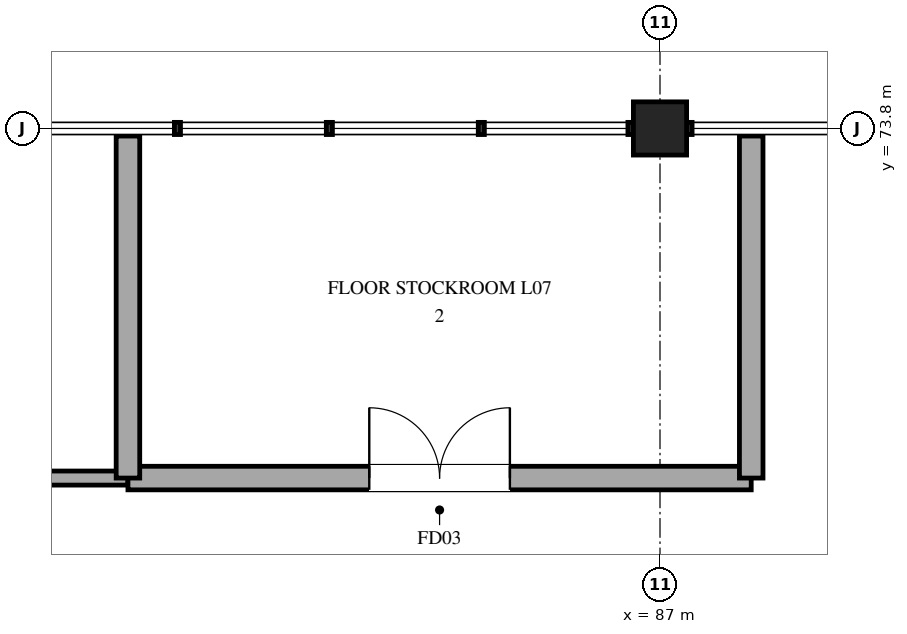
"""IFC4 building model, lengths in metres.
Left out: names, types, materials, properties, quantities, classifications, styles, units other than length and angle.
Written with IfcOpenShell. Run it as: python <this file> out.ifc"""

import sys

from ifc_helpers import new_model, si_unit, direction, frame, frame_2d, origin, origin_2d, place, context, subcontext, project, spatial, rectangle, extrude, element, fill, save


model = new_model("IFC4")
c1 = context("Model", 3, precision=1e-05, world=origin(), true_north=direction((0.0, 1.0)))
c2 = subcontext(c1, "Body", "Model", "MODEL_VIEW")
j1 = project(units=[si_unit("LENGTHUNIT", "METRE"), si_unit("PLANEANGLEUNIT", "RADIAN")], contexts=[c1])
p1 = place(None, origin())
s1 = spatial("IfcSite", under=j1, at=p1, CompositionType="ELEMENT")
p2 = place(p1, origin())
s2 = spatial("IfcBuilding", under=s1, at=p2, CompositionType="ELEMENT")
p3 = place(p2, frame((0.0, 0.0, 31.5)))
s3 = spatial("IfcBuildingStorey", under=s2, at=p3, CompositionType="ELEMENT", Elevation=31.5)
p4 = place(p3, frame((87.0, 73.8, 0.0), z_axis=(0.0, 0.0, 1.0), x_axis=(1.0, 0.0, 0.0)))
e1 = element("IfcColumn", 1, at=p4, inside=s3, PredefinedType="COLUMN", context=c2, shape_type="SweptSolid", body=[
    extrude(rectangle(XDim=0.7, YDim=0.7, at=origin_2d()), origin(), (0.0, 0.0, 1.0), 4.8),
])
p5 = place(p3, frame((52.2, 69.2, 0.0), z_axis=(0.0, 0.0, 1.0), x_axis=(1.0, 0.0, 0.0)))
e2 = element("IfcWall", 2, at=p5, inside=s3, PredefinedType="PARTITIONING", context=c2, shape_type="SweptSolid", body=[
    extrude(rectangle(XDim=27.8, YDim=0.185, at=frame_2d((13.9, 0.0))), origin(), (0.0, 0.0, 1.0), 3.76),
])
p6 = place(p5, frame((13.225, 0.0, 0.0)))
e3 = element("IfcOpeningElement", 3, at=p6, cuts=e2, PredefinedType="OPENING", context=c2, shape_type="SweptSolid", body=[
    extrude(rectangle(XDim=1.35, YDim=2.2, at=frame_2d((0.675, 1.1))), frame((0.0, 0.103, 0.0), z_axis=(0.0, -1.0, 0.0), x_axis=(1.0, 0.0, 0.0)), (0.0, 0.0, 1.0), 0.205),
])
p7 = place(p3, frame((80.0, 69.2, 0.0), z_axis=(0.0, 0.0, 1.0), x_axis=(1.0, 0.0, 0.0)))
e4 = element("IfcWall", 4, at=p7, inside=s3, PredefinedType="STANDARD", context=c2, shape_type="SweptSolid", body=[
    extrude(rectangle(XDim=8.2, YDim=0.31, at=frame_2d((4.1, 0.0))), origin(), (0.0, 0.0, 1.0), 3.76),
])
p8 = place(p7, frame((3.175, 0.0, 0.0)))
e5 = element("IfcOpeningElement", 5, at=p8, cuts=e4, PredefinedType="OPENING", context=c2, shape_type="SweptSolid", body=[
    extrude(rectangle(XDim=1.85, YDim=2.3, at=frame_2d((0.925, 1.15))), frame((0.0, 0.165, 0.0), z_axis=(0.0, -1.0, 0.0), x_axis=(1.0, 0.0, 0.0)), (0.0, 0.0, 1.0), 0.33),
])
for number, where, z_axis, x_axis in (
    (6, (88.2, 69.2, 0.0), (0.0, 0.0, 1.0), (0.0, 1.0, 0.0)),
    (7, (80.0, 73.7, 0.0), (0.0, 0.0, 1.0), (0.0, -1.0, 0.0)),
):
    element("IfcWall", number, at=place(p3, frame(where, z_axis=z_axis, x_axis=x_axis)), inside=s3, PredefinedType="STANDARD", context=c2, shape_type="SweptSolid", body=[
        extrude(rectangle(XDim=4.5, YDim=0.31, at=frame_2d((2.25, 0.0))), origin(), (0.0, 0.0, 1.0), 3.76),
    ])
p9 = place(p8, origin())
e8 = element("IfcDoor", 8, at=p9, inside=s3, OperationType="DOUBLE_DOOR_SINGLE_SWING", PredefinedType="DOOR", context=c2, shape_type="SweptSolid", body=[
    extrude(rectangle(XDim=1.85, YDim=2.3, at=frame_2d((0.925, 1.15))), frame((0.0, 0.025, 0.0), z_axis=(0.0, -1.0, 0.0), x_axis=(1.0, 0.0, 0.0)), (0.0, 0.0, 1.0), 0.05),
])
fill(e5, e8)
save(model, sys.argv[1])
